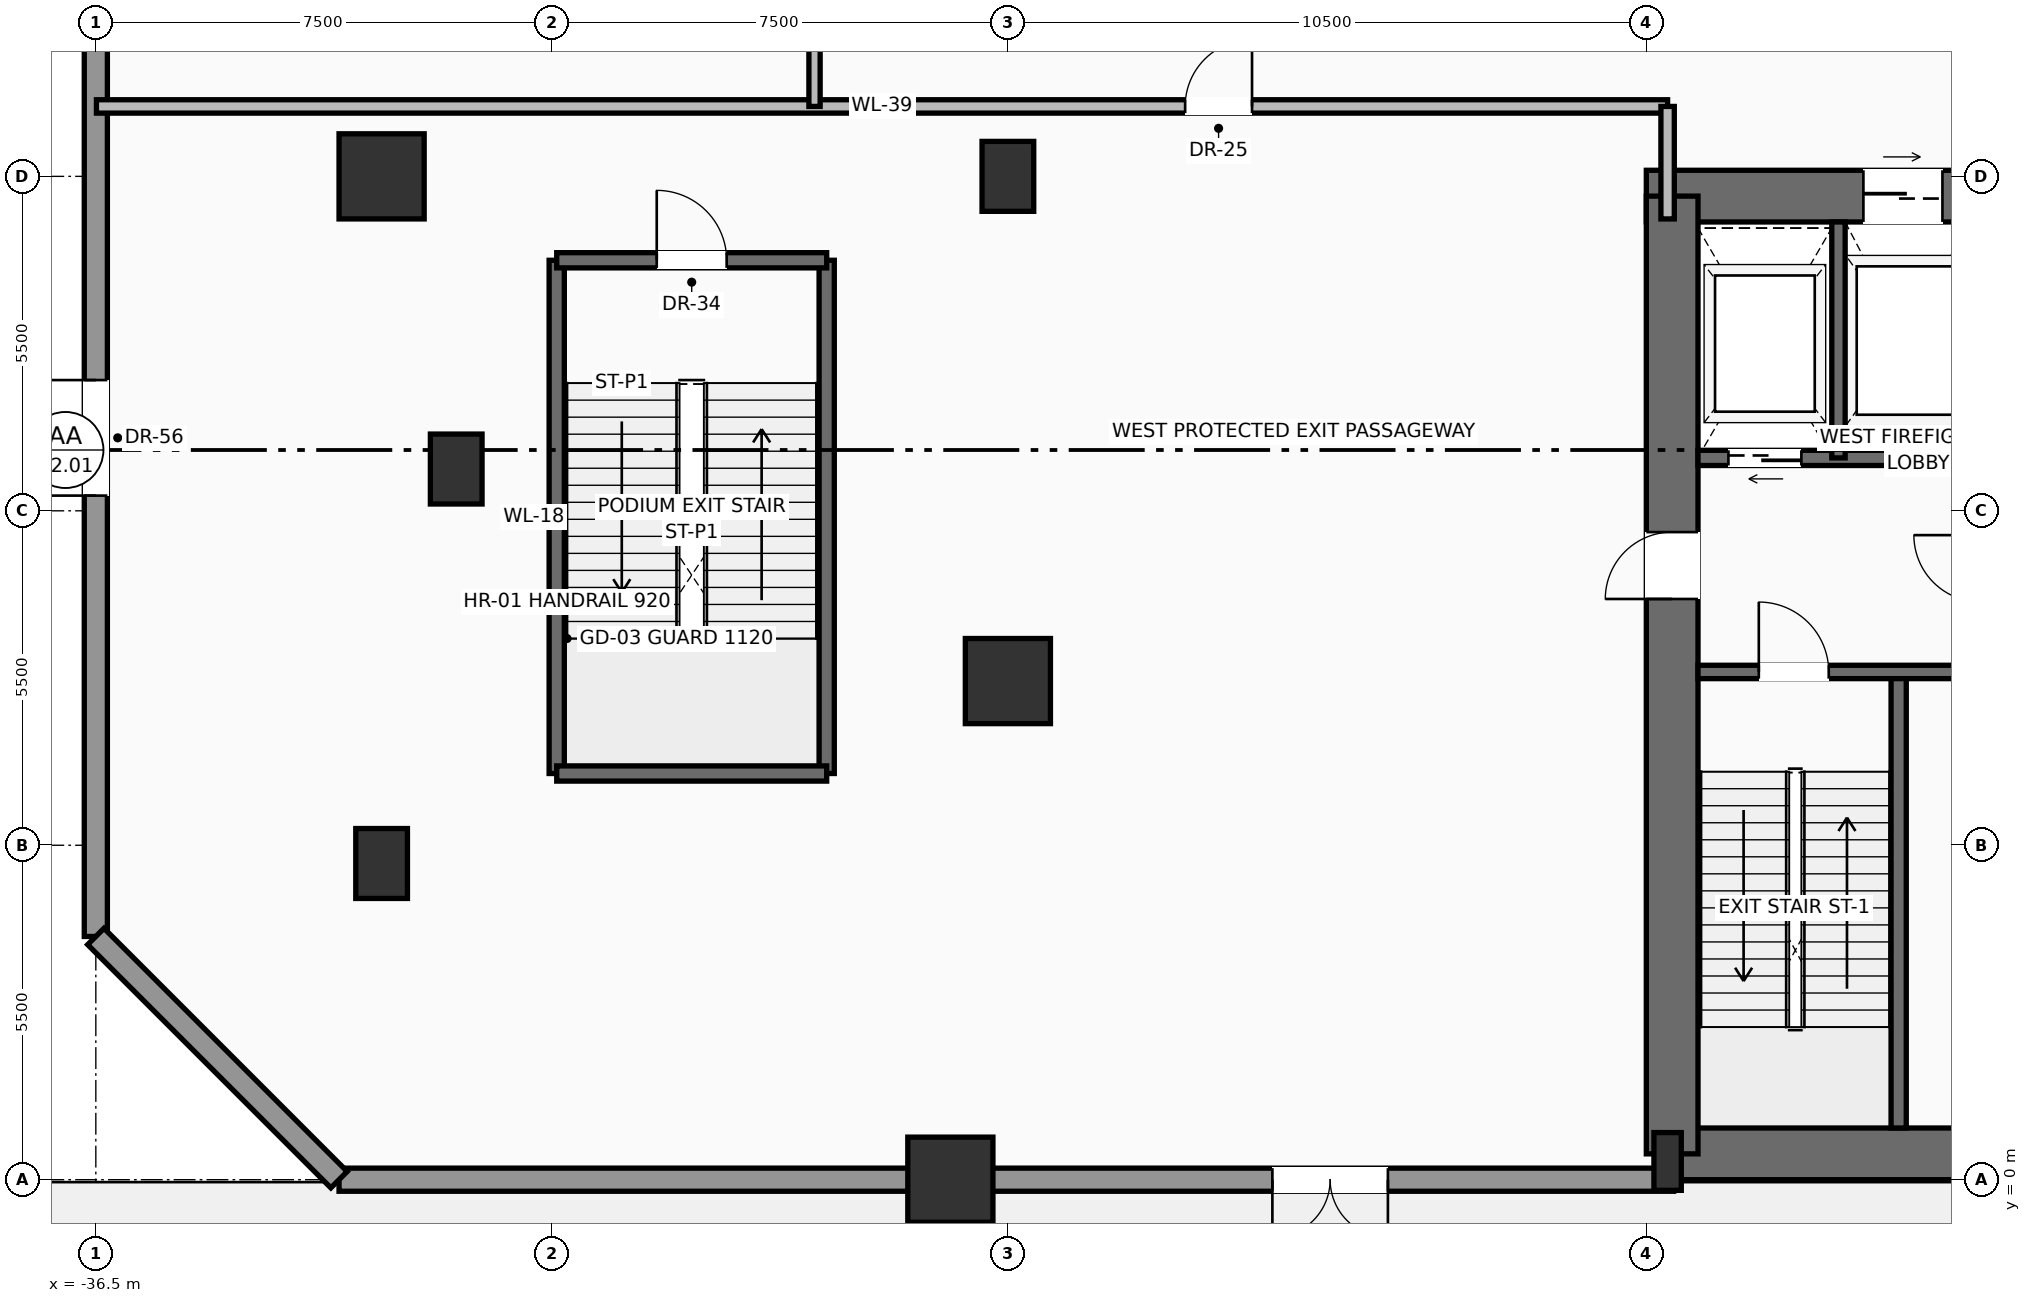
"""IFC4 building model, lengths in metres.
Left out: names, types, materials, properties, quantities, classifications, styles, units other than length and angle.
Written with IfcOpenShell. Run it as: python <this file> out.ifc"""

import sys

from ifc_helpers import new_model, si_unit, direction, frame, frame_2d, origin, origin_2d, place, context, subcontext, project, spatial, rectangle, hollow_rectangle, extrude, source, transform, mapped, element, fill, save


model = new_model("IFC4")
c1 = context("Model", 3, precision=1e-05, world=origin(), true_north=direction((0.0, 1.0)))
c2 = subcontext(c1, "Body", "Model", "MODEL_VIEW")
j1 = project(units=[si_unit("LENGTHUNIT", "METRE"), si_unit("PLANEANGLEUNIT", "RADIAN")], contexts=[c1])
p1 = place(None, origin())
s1 = spatial("IfcSite", under=j1, at=p1, CompositionType="ELEMENT")
p2 = place(p1, origin())
s2 = spatial("IfcBuilding", under=s1, at=p2, CompositionType="ELEMENT")
p3 = place(p2, origin())
s3 = spatial("IfcBuildingStorey", under=s2, at=p3, CompositionType="ELEMENT", Elevation=0.0)
p4 = place(p3, frame((-10.65, 0.425, 0.0), z_axis=(0.0, 0.0, 1.0), x_axis=(1.0, 0.0, 0.0)))
e1 = element("IfcWall", 1, at=p4, inside=s3, PredefinedType="SHEAR", context=c2, shape_type="SweptSolid", body=[
    extrude(rectangle(XDim=21.3, YDim=0.85, at=frame_2d((10.65, 0.0))), origin(), (0.0, 0.0, 1.0), 5.15),
])
p5 = place(p3, frame((-11.0, 16.175, 0.0), z_axis=(0.0, 0.0, 1.0), x_axis=(1.0, 0.0, 0.0)))
e2 = element("IfcWall", 2, at=p5, inside=s3, PredefinedType="SHEAR", context=c2, shape_type="SweptSolid", body=[
    extrude(rectangle(XDim=22.0, YDim=0.85, at=frame_2d((11.0, 0.0))), origin(), (0.0, 0.0, 1.0), 5.15),
])
p6 = place(p5, frame((3.57, 0.0, 0.0)))
e3 = element("IfcOpeningElement", 3, at=p6, cuts=e2, PredefinedType="OPENING", context=c2, shape_type="SweptSolid", body=[
    extrude(rectangle(XDim=1.3, YDim=2.3, at=frame_2d((0.65, 1.15))), frame((0.0, 0.435, 0.0), z_axis=(0.0, -1.0, 0.0), x_axis=(1.0, 0.0, 0.0)), (0.0, 0.0, 1.0), 0.87),
])
p7 = place(p5, frame((10.0, 0.0, 0.0)))
e4 = element("IfcOpeningElement", 4, at=p7, cuts=e2, PredefinedType="OPENING", context=c2, shape_type="SweptSolid", body=[
    extrude(rectangle(XDim=2.0, YDim=2.4, at=frame_2d((1.0, 1.2))), frame((0.0, 0.435, 0.0), z_axis=(0.0, -1.0, 0.0), x_axis=(1.0, 0.0, 0.0)), (0.0, 0.0, 1.0), 0.87),
])
p8 = place(p3, frame((-10.575, 0.425, 0.0), z_axis=(0.0, 0.0, 1.0), x_axis=(0.0, 1.0, 0.0)))
e5 = element("IfcWall", 5, at=p8, inside=s3, PredefinedType="SHEAR", context=c2, shape_type="SweptSolid", body=[
    extrude(rectangle(XDim=15.75, YDim=0.85, at=frame_2d((7.875, 0.0))), origin(), (0.0, 0.0, 1.0), 5.15),
])
p9 = place(p8, frame((9.125, 0.0, 0.0)))
e6 = element("IfcOpeningElement", 6, at=p9, cuts=e5, PredefinedType="OPENING", context=c2, shape_type="SweptSolid", body=[
    extrude(rectangle(XDim=1.1, YDim=2.2, at=frame_2d((0.55, 1.1))), frame((0.0, 0.435, 0.0), z_axis=(0.0, -1.0, 0.0), x_axis=(1.0, 0.0, 0.0)), (0.0, 0.0, 1.0), 0.87),
])
m1 = source(origin(), c2, "Body", "SweptSolid", [
    extrude(rectangle(XDim=0.45, YDim=0.95, at=origin_2d()), origin(), (0.0, 0.0, 1.0), 5.5),
])
p10 = place(p3, frame((-10.65, 0.3, 0.0), z_axis=(0.0, 0.0, 1.0), x_axis=(1.0, 0.0, 0.0)))
e7 = element("IfcColumn", 7, at=p10, inside=s3, PredefinedType="PILASTER", context=c2, shape_type="MappedRepresentation", body=[
    mapped(m1, transform((0.0, 0.0, 0.0), scale=1.0)),
])
m2 = source(origin(), c2, "Body", "SweptSolid", [
    extrude(hollow_rectangle(XDim=1.4, YDim=1.4, WallThickness=0.07, at=origin_2d()), origin(), (0.0, 0.0, 1.0), 5.5),
])
for number, where, z_axis, x_axis in (
    (8, (-22.446, 0.0, 0.0), (0.0, 0.0, 1.0), (1.0, 0.0, 0.0)),
    (9, (-21.5, 8.2, 0.0), (0.0, 0.0, 1.0), (1.0, 0.0, 0.0)),
    (10, (-31.8, 16.5, 0.0), (0.0, 0.0, 1.0), (1.0, 0.0, 0.0)),
):
    element("IfcColumn", number, at=place(p3, frame(where, z_axis=z_axis, x_axis=x_axis)), inside=s3, PredefinedType="COLUMN", context=c2, shape_type="MappedRepresentation", body=[
        mapped(m2, transform((0.0, 0.0, 0.0), scale=1.0)),
    ])
m3 = source(origin(), c2, "Body", "SweptSolid", [
    extrude(rectangle(XDim=0.85, YDim=1.15, at=origin_2d()), origin(), (0.0, 0.0, 1.0), 5.5),
])
for number, where, z_axis, x_axis in (
    (11, (-21.5, 16.5, 0.0), (0.0, 0.0, 1.0), (1.0, 0.0, 0.0)),
    (12, (-31.8, 5.2, 0.0), (0.0, 0.0, 1.0), (1.0, 0.0, 0.0)),
    (13, (-30.573, 11.687, 0.0), (0.0, 0.0, 1.0), (1.0, 0.0, 0.0)),
):
    element("IfcColumn", number, at=place(p3, frame(where, z_axis=z_axis, x_axis=x_axis)), inside=s3, PredefinedType="COLUMN", context=c2, shape_type="MappedRepresentation", body=[
        mapped(m3, transform((0.0, 0.0, 0.0), scale=1.0)),
    ])
p11 = place(p3, frame((-36.5, 4.0, 0.0), z_axis=(0.0, 0.0, 1.0), x_axis=(0.0, 1.0, 0.0)))
e14 = element("IfcWall", 14, at=p11, inside=s3, PredefinedType="SOLIDWALL", context=c2, shape_type="SweptSolid", body=[
    extrude(rectangle(XDim=42.0, YDim=0.38, at=frame_2d((21.0, 0.0))), origin(), (0.0, 0.0, 1.0), 4.09),
])
p12 = place(p11, frame((7.25, 0.0, 0.0)))
e15 = element("IfcOpeningElement", 15, at=p12, cuts=e14, PredefinedType="OPENING", context=c2, shape_type="SweptSolid", body=[
    extrude(rectangle(XDim=1.9, YDim=2.3, at=frame_2d((0.95, 1.15))), frame((0.0, 0.2, 0.0), z_axis=(0.0, -1.0, 0.0), x_axis=(1.0, 0.0, 0.0)), (0.0, 0.0, 1.0), 0.4),
])
p13 = place(p11, frame((28.55, 0.0, 0.0)))
e16 = element("IfcOpeningElement", 16, at=p13, cuts=e14, PredefinedType="OPENING", context=c2, shape_type="SweptSolid", body=[
    extrude(rectangle(XDim=1.9, YDim=2.3, at=frame_2d((0.95, 1.15))), frame((0.0, 0.2, 0.0), z_axis=(0.0, -1.0, 0.0), x_axis=(1.0, 0.0, 0.0)), (0.0, 0.0, 1.0), 0.4),
])
p14 = place(p11, frame((16.7, 0.0, 0.0)))
e17 = element("IfcOpeningElement", 17, at=p14, cuts=e14, PredefinedType="OPENING", context=c2, shape_type="SweptSolid", body=[
    extrude(rectangle(XDim=3.6, YDim=3.8, at=frame_2d((1.8, 1.9))), frame((0.0, 0.2, 0.0), z_axis=(0.0, -1.0, 0.0), x_axis=(1.0, 0.0, 0.0)), (0.0, 0.0, 1.0), 0.4),
])
p15 = place(p3, frame((-10.55, 0.0, 0.0), z_axis=(0.0, 0.0, 1.0), x_axis=(-1.0, 0.0, 0.0)))
e18 = element("IfcWall", 18, at=p15, inside=s3, PredefinedType="SOLIDWALL", context=c2, shape_type="SweptSolid", body=[
    extrude(rectangle(XDim=21.95, YDim=0.38, at=frame_2d((10.975, 0.0))), origin(), (0.0, 0.0, 1.0), 4.09),
])
p16 = place(p15, frame((4.7, 0.0, 0.0)))
e19 = element("IfcOpeningElement", 19, at=p16, cuts=e18, PredefinedType="OPENING", context=c2, shape_type="SweptSolid", body=[
    extrude(rectangle(XDim=1.9, YDim=2.3, at=frame_2d((0.95, 1.15))), frame((0.0, 0.2, 0.0), z_axis=(0.0, -1.0, 0.0), x_axis=(1.0, 0.0, 0.0)), (0.0, 0.0, 1.0), 0.4),
])
p17 = place(p3, frame((-32.5, 0.0, 0.0), z_axis=(0.0, 0.0, 1.0), x_axis=(-0.707106781187, 0.707106781187, 0.0)))
e20 = element("IfcWall", 20, at=p17, inside=s3, PredefinedType="SOLIDWALL", context=c2, shape_type="SweptSolid", body=[
    extrude(rectangle(XDim=5.657, YDim=0.38, at=frame_2d((2.828, 0.0))), origin(), (0.0, 0.0, 1.0), 4.09),
])
p18 = place(p3, frame((-6.85, 0.85, 0.0), z_axis=(0.0, 0.0, 1.0), x_axis=(0.0, 1.0, 0.0)))
e21 = element("IfcWall", 21, at=p18, inside=s3, PredefinedType="SOLIDWALL", context=c2, shape_type="SweptSolid", body=[
    extrude(rectangle(XDim=7.5, YDim=0.25, at=frame_2d((3.75, 0.0))), origin(), (0.0, 0.0, 1.0), 5.15),
])
p19 = place(p3, frame((-10.15, 8.35, 0.0), z_axis=(0.0, 0.0, 1.0), x_axis=(1.0, 0.0, 0.0)))
e22 = element("IfcWall", 22, at=p19, inside=s3, PredefinedType="SOLIDWALL", context=c2, shape_type="SweptSolid", body=[
    extrude(rectangle(XDim=4.65, YDim=0.22, at=frame_2d((2.325, 0.0))), origin(), (0.0, 0.0, 1.0), 5.15),
])
p20 = place(p19, frame((1.0, 0.0, 0.0)))
e23 = element("IfcOpeningElement", 23, at=p20, cuts=e22, PredefinedType="OPENING", context=c2, shape_type="SweptSolid", body=[
    extrude(rectangle(XDim=1.15, YDim=2.2, at=frame_2d((0.575, 1.1))), frame((0.0, 0.12, 0.0), z_axis=(0.0, -1.0, 0.0), x_axis=(1.0, 0.0, 0.0)), (0.0, 0.0, 1.0), 0.24),
])
p21 = place(p3, frame((-5.5, 11.87, 0.0), z_axis=(0.0, 0.0, 1.0), x_axis=(-1.0, 0.0, 0.0)))
e24 = element("IfcWall", 24, at=p21, inside=s3, PredefinedType="SOLIDWALL", context=c2, shape_type="SweptSolid", body=[
    extrude(rectangle(XDim=4.65, YDim=0.25, at=frame_2d((2.325, 0.0))), origin(), (0.0, 0.0, 1.0), 5.15),
])
p22 = place(p21, frame((2.95, 0.0, 0.0)))
e25 = element("IfcOpeningElement", 25, at=p22, cuts=e24, PredefinedType="OPENING", context=c2, shape_type="SweptSolid", body=[
    extrude(rectangle(XDim=1.2, YDim=2.25, at=frame_2d((0.6, 1.125))), frame((0.0, 0.135, 0.0), z_axis=(0.0, -1.0, 0.0), x_axis=(1.0, 0.0, 0.0)), (0.0, 0.0, 1.0), 0.27),
])
p23 = place(p3, frame((-7.84, 11.87, 0.0), z_axis=(0.0, 0.0, 1.0), x_axis=(0.0, 1.0, 0.0)))
e26 = element("IfcWall", 26, at=p23, inside=s3, PredefinedType="SOLIDWALL", context=c2, shape_type="SweptSolid", body=[
    extrude(rectangle(XDim=3.88, YDim=0.22, at=frame_2d((1.94, 0.0))), origin(), (0.0, 0.0, 1.0), 5.15),
])
for number, where, z_axis, x_axis in (
    (27, (-28.92, 6.68, 0.0), (0.0, 0.0, 1.0), (0.0, 1.0, 0.0)),
    (28, (-24.48, 6.68, 0.0), (0.0, 0.0, 1.0), (0.0, 1.0, 0.0)),
):
    element("IfcWall", number, at=place(p3, frame(where, z_axis=z_axis, x_axis=x_axis)), inside=s3, PredefinedType="SOLIDWALL", context=c2, shape_type="SweptSolid", body=[
        extrude(rectangle(XDim=8.44, YDim=0.25, at=frame_2d((4.22, 0.0))), origin(), (0.0, 0.0, 1.0), 5.15),
    ])
p24 = place(p3, frame((-24.48, 6.68, 0.0), z_axis=(0.0, 0.0, 1.0), x_axis=(-1.0, 0.0, 0.0)))
e29 = element("IfcWall", 29, at=p24, inside=s3, PredefinedType="SOLIDWALL", context=c2, shape_type="SweptSolid", body=[
    extrude(rectangle(XDim=4.44, YDim=0.25, at=frame_2d((2.22, 0.0))), origin(), (0.0, 0.0, 1.0), 5.15),
])
p25 = place(p3, frame((-28.92, 15.12, 0.0), z_axis=(0.0, 0.0, 1.0), x_axis=(1.0, 0.0, 0.0)))
e30 = element("IfcWall", 30, at=p25, inside=s3, PredefinedType="SOLIDWALL", context=c2, shape_type="SweptSolid", body=[
    extrude(rectangle(XDim=4.44, YDim=0.25, at=frame_2d((2.22, 0.0))), origin(), (0.0, 0.0, 1.0), 5.15),
])
p26 = place(p25, frame((1.645, 0.0, 0.0)))
e31 = element("IfcOpeningElement", 31, at=p26, cuts=e30, PredefinedType="OPENING", context=c2, shape_type="SweptSolid", body=[
    extrude(rectangle(XDim=1.15, YDim=2.2, at=frame_2d((0.575, 1.1))), frame((0.0, 0.135, 0.0), z_axis=(0.0, -1.0, 0.0), x_axis=(1.0, 0.0, 0.0)), (0.0, 0.0, 1.0), 0.27),
])
p27 = place(p3, frame((-36.49, 17.65, 0.0), z_axis=(0.0, 0.0, 1.0), x_axis=(1.0, 0.0, 0.0)))
e32 = element("IfcWall", 32, at=p27, inside=s3, PredefinedType="SOLIDWALL", context=c2, shape_type="SweptSolid", body=[
    extrude(rectangle(XDim=25.84, YDim=0.22, at=frame_2d((12.92, 0.0))), origin(), (0.0, 0.0, 1.0), 4.102),
])
p28 = place(p27, frame((17.905, 0.0, 0.0)))
e33 = element("IfcOpeningElement", 33, at=p28, cuts=e32, PredefinedType="OPENING", context=c2, shape_type="SweptSolid", body=[
    extrude(rectangle(XDim=1.1, YDim=2.2, at=frame_2d((0.55, 1.1))), frame((0.0, 0.12, 0.0), z_axis=(0.0, -1.0, 0.0), x_axis=(1.0, 0.0, 0.0)), (0.0, 0.0, 1.0), 0.24),
])
p29 = place(p3, frame((-10.65, 15.8, 0.0), z_axis=(0.0, 0.0, 1.0), x_axis=(0.0, 1.0, 0.0)))
e34 = element("IfcWall", 34, at=p29, inside=s3, PredefinedType="SOLIDWALL", context=c2, shape_type="SweptSolid", body=[
    extrude(rectangle(XDim=1.85, YDim=0.22, at=frame_2d((0.925, 0.0))), origin(), (0.0, 0.0, 1.0), 4.102),
])
p30 = place(p3, frame((-24.68, 17.65, 0.0), z_axis=(0.0, 0.0, 1.0), x_axis=(0.0, 1.0, 0.0)))
e35 = element("IfcWall", 35, at=p30, inside=s3, PredefinedType="PARTITIONING", context=c2, shape_type="SweptSolid", body=[
    extrude(rectangle(XDim=11.63, YDim=0.185, at=frame_2d((5.815, 0.0))), origin(), (0.0, 0.0, 1.0), 4.215),
])
p31 = place(p30, frame((5.065, 0.0, 0.0)))
e36 = element("IfcOpeningElement", 36, at=p31, cuts=e35, PredefinedType="OPENING", context=c2, shape_type="SweptSolid", body=[
    extrude(rectangle(XDim=1.5, YDim=2.25, at=frame_2d((0.75, 1.125))), frame((0.0, 0.103, 0.0), z_axis=(0.0, -1.0, 0.0), x_axis=(1.0, 0.0, 0.0)), (0.0, 0.0, 1.0), 0.205),
])
m4 = source(origin(), c2, "Body", "SweptSolid", [
    extrude(rectangle(XDim=1.9, YDim=2.3, at=frame_2d((0.95, 1.15))), frame((0.0, 0.025, 0.0), z_axis=(0.0, -1.0, 0.0), x_axis=(1.0, 0.0, 0.0)), (0.0, 0.0, 1.0), 0.05),
])
p32 = place(p12, origin())
e37 = element("IfcDoor", 37, at=p32, inside=s3, OperationType="DOUBLE_DOOR_SINGLE_SWING", PredefinedType="DOOR", context=c2, shape_type="MappedRepresentation", body=[
    mapped(m4, transform((0.0, 0.0, 0.0), scale=1.0)),
])
fill(e15, e37)
p33 = place(p16, origin())
e38 = element("IfcDoor", 38, at=p33, inside=s3, OperationType="DOUBLE_DOOR_SINGLE_SWING", PredefinedType="DOOR", context=c2, shape_type="MappedRepresentation", body=[
    mapped(m4, transform((0.0, 0.0, 0.0), scale=1.0)),
])
fill(e19, e38)
m5 = source(origin(), c2, "Body", "SweptSolid", [
    extrude(rectangle(XDim=1.15, YDim=2.2, at=frame_2d((0.575, 1.1))), frame((0.0, 0.025, 0.0), z_axis=(0.0, -1.0, 0.0), x_axis=(1.0, 0.0, 0.0)), (0.0, 0.0, 1.0), 0.05),
])
p34 = place(p20, origin())
e39 = element("IfcDoor", 39, at=p34, inside=s3, OperationType="SINGLE_SWING_LEFT", PredefinedType="DOOR", context=c2, shape_type="MappedRepresentation", body=[
    mapped(m5, transform((0.0, 0.0, 0.0), scale=1.0)),
])
fill(e23, e39)
m6 = source(origin(), c2, "Body", "SweptSolid", [
    extrude(rectangle(XDim=1.2, YDim=2.25, at=frame_2d((0.6, 1.125))), frame((0.0, 0.025, 0.0), z_axis=(0.0, -1.0, 0.0), x_axis=(1.0, 0.0, 0.0)), (0.0, 0.0, 1.0), 0.05),
])
p35 = place(p22, origin())
e40 = element("IfcDoor", 40, at=p35, inside=s3, OperationType="SLIDING_TO_LEFT", PredefinedType="DOOR", context=c2, shape_type="MappedRepresentation", body=[
    mapped(m6, transform((0.0, 0.0, 0.0), scale=1.0)),
])
fill(e25, e40)
m7 = source(origin(), c2, "Body", "SweptSolid", [
    extrude(rectangle(XDim=1.3, YDim=2.3, at=frame_2d((0.65, 1.15))), frame((0.0, 0.025, 0.0), z_axis=(0.0, -1.0, 0.0), x_axis=(1.0, 0.0, 0.0)), (0.0, 0.0, 1.0), 0.05),
])
p36 = place(p6, origin())
e41 = element("IfcDoor", 41, at=p36, inside=s3, OperationType="SLIDING_TO_RIGHT", PredefinedType="DOOR", context=c2, shape_type="MappedRepresentation", body=[
    mapped(m7, transform((0.0, 0.0, 0.0), scale=1.0)),
])
fill(e3, e41)
m8 = source(origin(), c2, "Body", "SweptSolid", [
    extrude(rectangle(XDim=1.1, YDim=2.2, at=frame_2d((0.55, 1.1))), frame((0.0, 0.025, 0.0), z_axis=(0.0, -1.0, 0.0), x_axis=(1.0, 0.0, 0.0)), (0.0, 0.0, 1.0), 0.05),
])
p37 = place(p9, origin())
e42 = element("IfcDoor", 42, at=p37, inside=s3, OperationType="SINGLE_SWING_LEFT", PredefinedType="DOOR", context=c2, shape_type="MappedRepresentation", body=[
    mapped(m8, transform((0.0, 0.0, 0.0), scale=1.0)),
])
fill(e6, e42)
p38 = place(p26, origin())
e43 = element("IfcDoor", 43, at=p38, inside=s3, OperationType="SINGLE_SWING_LEFT", PredefinedType="DOOR", context=c2, shape_type="MappedRepresentation", body=[
    mapped(m5, transform((0.0, 0.0, 0.0), scale=1.0)),
])
fill(e31, e43)
p39 = place(p28, origin())
e44 = element("IfcDoor", 44, at=p39, inside=s3, OperationType="SINGLE_SWING_RIGHT", PredefinedType="DOOR", context=c2, shape_type="MappedRepresentation", body=[
    mapped(m8, transform((0.0, 0.0, 0.0), scale=1.0)),
])
fill(e33, e44)
save(model, sys.argv[1])
